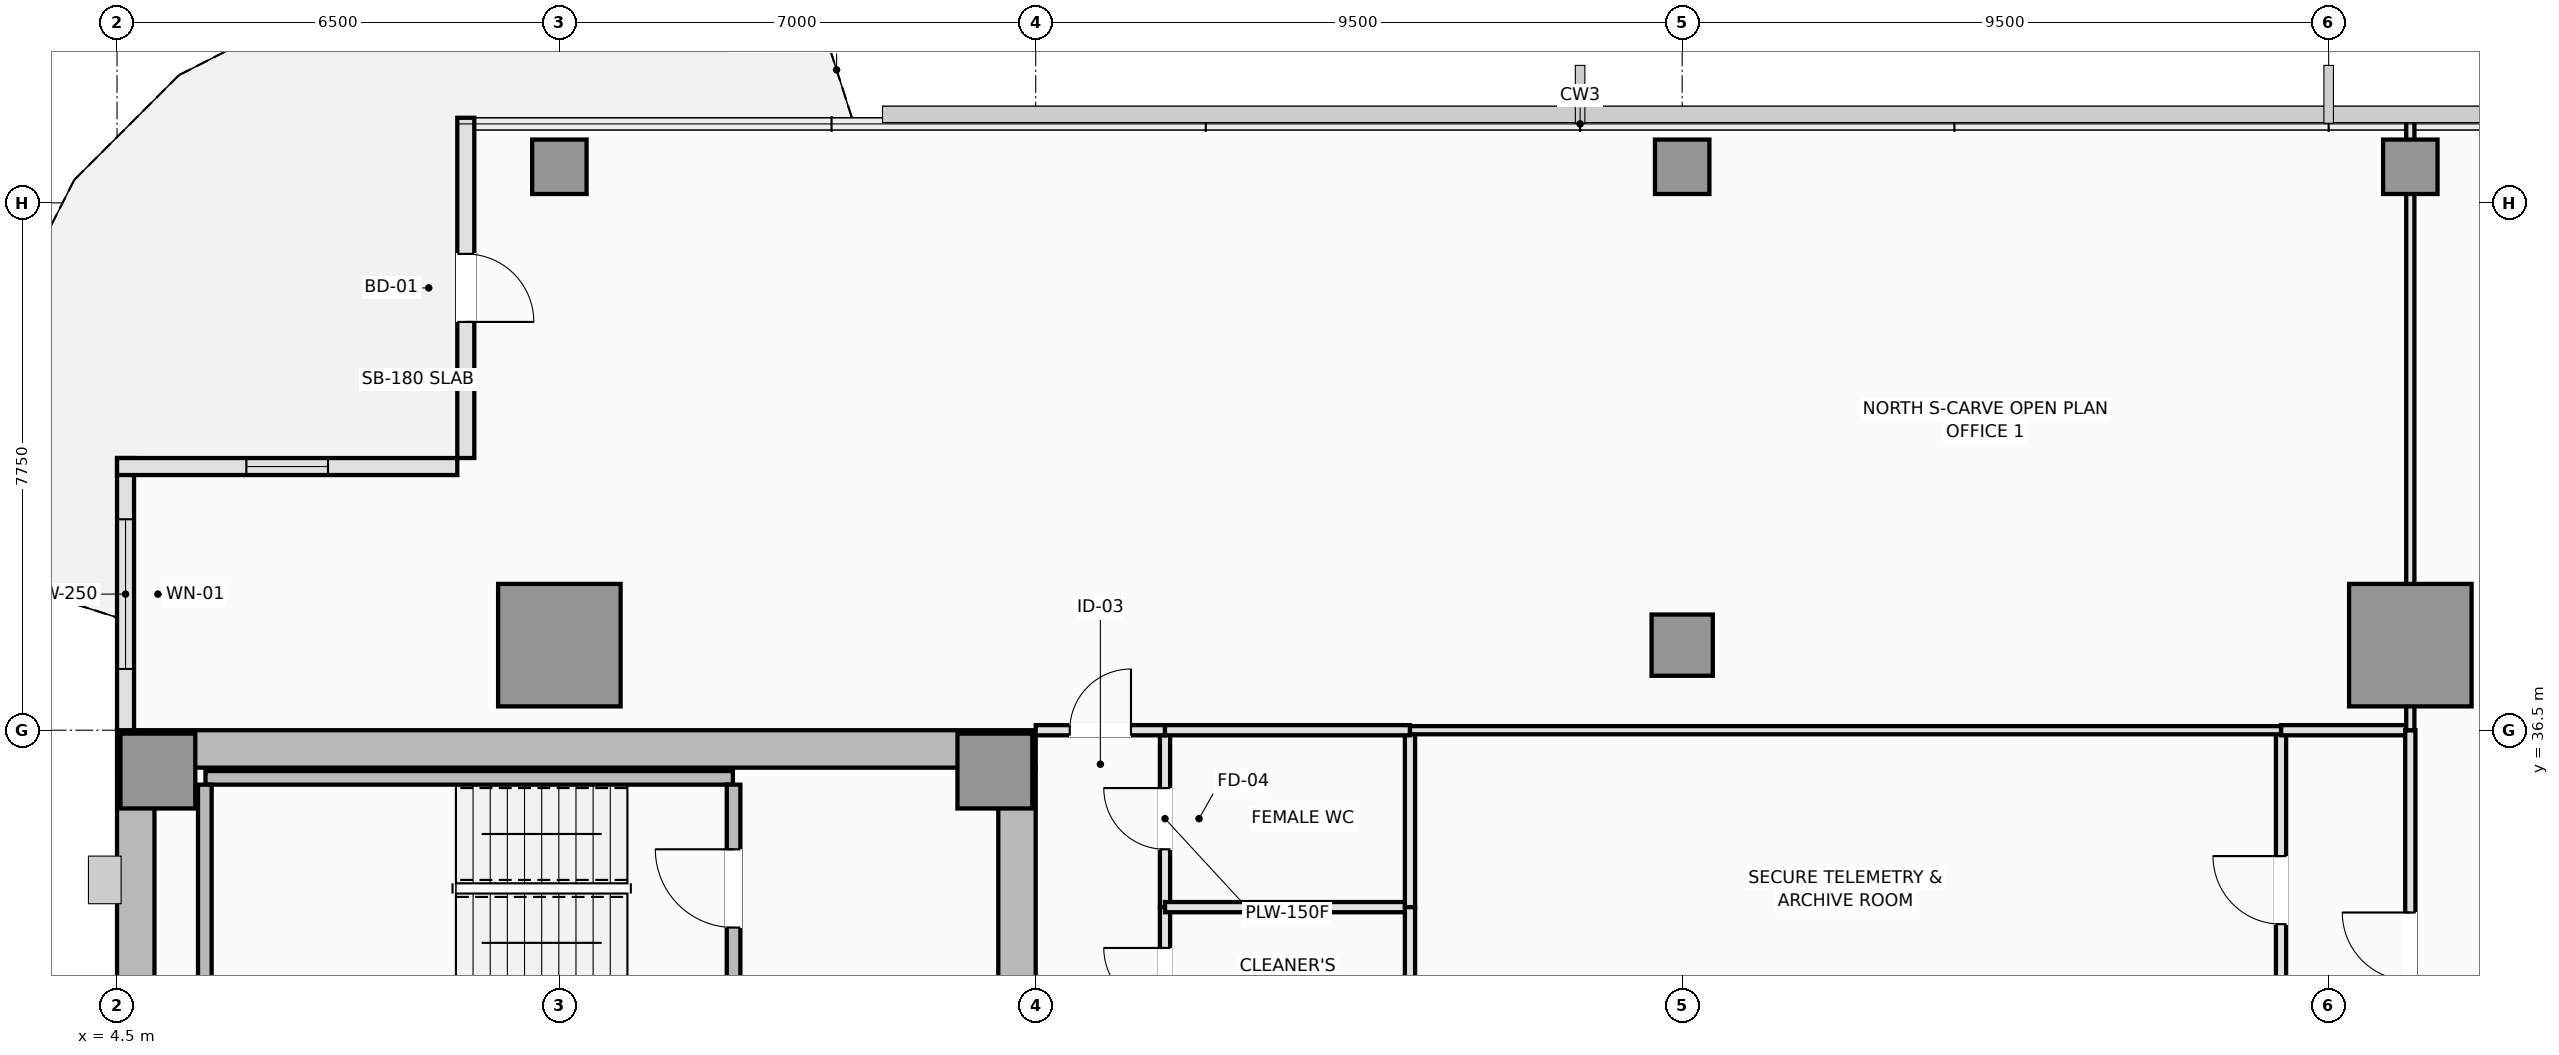
"""IFC4 building model, lengths in metres.
Left out: names, types, materials, properties, quantities, classifications, styles, units other than length and angle.
Written with IfcOpenShell. Run it as: python <this file> out.ifc"""

import sys

from ifc_helpers import new_model, si_unit, direction, frame, frame_2d, origin, origin_2d, place, context, subcontext, project, spatial, rectangle, extrude, element, fill, save


model = new_model("IFC4")
c1 = context("Model", 3, precision=1e-05, world=origin(), true_north=direction((0.0, 1.0)))
c2 = subcontext(c1, "Body", "Model", "MODEL_VIEW")
j1 = project(units=[si_unit("LENGTHUNIT", "METRE"), si_unit("PLANEANGLEUNIT", "RADIAN")], contexts=[c1])
p1 = place(None, origin())
s1 = spatial("IfcSite", under=j1, at=p1, CompositionType="ELEMENT")
p2 = place(p1, origin())
s2 = spatial("IfcBuilding", under=s1, at=p2, CompositionType="ELEMENT")
p3 = place(p2, frame((0.0, 0.0, 202.25)))
s3 = spatial("IfcBuildingStorey", under=s2, at=p3, CompositionType="ELEMENT", Elevation=202.25)
p4 = place(p3, frame((4.5, 36.225, 0.0), z_axis=(0.0, 0.0, 1.0), x_axis=(1.0, 0.0, 0.0)))
e1 = element("IfcWall", 1, at=p4, inside=s3, PredefinedType="SHEAR", context=c2, shape_type="SweptSolid", body=[
    extrude(rectangle(XDim=13.5, YDim=0.55, at=frame_2d((6.75, 0.0))), origin(), (0.0, 0.0, 1.0), 3.55),
])
p5 = place(p3, frame((4.775, 14.55, 0.0), z_axis=(0.0, 0.0, 1.0), x_axis=(0.0, 1.0, 0.0)))
e2 = element("IfcWall", 2, at=p5, inside=s3, PredefinedType="SHEAR", context=c2, shape_type="SweptSolid", body=[
    extrude(rectangle(XDim=21.4, YDim=0.55, at=frame_2d((10.7, 0.0))), origin(), (0.0, 0.0, 1.0), 3.55),
])
p6 = place(p3, frame((17.725, 27.05, 0.0), z_axis=(0.0, 0.0, 1.0), x_axis=(0.0, 1.0, 0.0)))
e3 = element("IfcWall", 3, at=p6, inside=s3, PredefinedType="SHEAR", context=c2, shape_type="SweptSolid", body=[
    extrude(rectangle(XDim=8.9, YDim=0.55, at=frame_2d((4.45, 0.0))), origin(), (0.0, 0.0, 1.0), 3.55),
])
p7 = place(p6, frame((3.45, 0.0, 0.0)))
e4 = element("IfcOpeningElement", 4, at=p7, cuts=e3, PredefinedType="OPENING", context=c2, shape_type="SweptSolid", body=[
    extrude(rectangle(XDim=1.1, YDim=2.15, at=frame_2d((0.55, 1.075))), frame((0.0, 0.285, 0.0), z_axis=(0.0, -1.0, 0.0), x_axis=(1.0, 0.0, 0.0)), (0.0, 0.0, 1.0), 0.57),
])
for number, where, z_axis, x_axis in (
    (5, (5.1, 35.9, 0.0), (0.0, 0.0, 1.0), (1.0, 0.0, 0.0)),
    (6, (17.4, 35.9, 0.0), (0.0, 0.0, 1.0), (1.0, 0.0, 0.0)),
):
    element("IfcColumn", number, at=place(p3, frame(where, z_axis=z_axis, x_axis=x_axis)), inside=s3, PredefinedType="PILASTER", context=c2, shape_type="SweptSolid", body=[
        extrude(rectangle(XDim=1.1, YDim=1.1, at=origin_2d()), origin(), (0.0, 0.0, 1.0), 3.55),
    ])
for number, where, z_axis, x_axis in (
    (7, (11.0, 37.75, 0.0), (0.0, 0.0, 1.0), (1.0, 0.0, 0.0)),
    (8, (38.2, 37.75, 0.0), (0.0, 0.0, 1.0), (1.0, 0.0, 0.0)),
):
    element("IfcColumn", number, at=place(p3, frame(where, z_axis=z_axis, x_axis=x_axis)), inside=s3, PredefinedType="COLUMN", context=c2, shape_type="SweptSolid", body=[
        extrude(rectangle(XDim=1.8, YDim=1.8, at=origin_2d()), origin(), (0.0, 0.0, 1.0), 3.55),
    ])
p8 = place(p3, frame((27.5, 37.75, 0.0), z_axis=(0.0, 0.0, 1.0), x_axis=(1.0, 0.0, 0.0)))
e9 = element("IfcColumn", 9, at=p8, inside=s3, PredefinedType="COLUMN", context=c2, shape_type="SweptSolid", body=[
    extrude(rectangle(XDim=0.9, YDim=0.9, at=origin_2d()), origin(), (0.0, 0.0, 1.0), 3.55),
])
for number, where, z_axis, x_axis in (
    (10, (11.0, 44.78, 0.0), (0.0, 0.0, 1.0), (1.0, 0.0, 0.0)),
    (11, (27.5, 44.78, 0.0), (0.0, 0.0, 1.0), (1.0, 0.0, 0.0)),
    (12, (38.2, 44.78, 0.0), (0.0, 0.0, 1.0), (1.0, 0.0, 0.0)),
):
    element("IfcColumn", number, at=place(p3, frame(where, z_axis=z_axis, x_axis=x_axis)), inside=s3, PredefinedType="COLUMN", context=c2, shape_type="SweptSolid", body=[
        extrude(rectangle(XDim=0.8, YDim=0.8, at=origin_2d()), origin(), (0.0, 0.0, 1.0), 3.55),
    ])
p9 = place(p3, frame((4.625, 40.5, 0.0), z_axis=(0.0, 0.0, 1.0), x_axis=(0.0, -1.0, 0.0)))
e13 = element("IfcWall", 13, at=p9, inside=s3, PredefinedType="SOLIDWALL", context=c2, shape_type="SweptSolid", body=[
    extrude(rectangle(XDim=4.0, YDim=0.25, at=frame_2d((2.0, 0.0))), origin(), (0.0, 0.0, 1.0), 3.37),
])
p10 = place(p9, frame((0.9, 0.0, 0.9)))
e14 = element("IfcOpeningElement", 14, at=p10, cuts=e13, PredefinedType="OPENING", context=c2, shape_type="SweptSolid", body=[
    extrude(rectangle(XDim=2.2, YDim=1.8, at=frame_2d((1.1, 0.9))), frame((0.0, 0.135, 0.0), z_axis=(0.0, -1.0, 0.0), x_axis=(1.0, 0.0, 0.0)), (0.0, 0.0, 1.0), 0.27),
])
p11 = place(p3, frame((9.625, 45.5, 0.0), z_axis=(0.0, 0.0, 1.0), x_axis=(0.0, -1.0, 0.0)))
e15 = element("IfcWall", 15, at=p11, inside=s3, PredefinedType="SOLIDWALL", context=c2, shape_type="SweptSolid", body=[
    extrude(rectangle(XDim=5.0, YDim=0.25, at=frame_2d((2.5, 0.0))), origin(), (0.0, 0.0, 1.0), 3.1),
])
p12 = place(p11, frame((2.0, 0.0, 0.0)))
e16 = element("IfcOpeningElement", 16, at=p12, cuts=e15, PredefinedType="OPENING", context=c2, shape_type="SweptSolid", body=[
    extrude(rectangle(XDim=1.0, YDim=2.2, at=frame_2d((0.5, 1.1))), frame((0.0, 0.135, 0.0), z_axis=(0.0, -1.0, 0.0), x_axis=(1.0, 0.0, 0.0)), (0.0, 0.0, 1.0), 0.27),
])
p13 = place(p3, frame((9.5, 40.375, 0.0), z_axis=(0.0, 0.0, 1.0), x_axis=(-1.0, 0.0, 0.0)))
e17 = element("IfcWall", 17, at=p13, inside=s3, PredefinedType="SOLIDWALL", context=c2, shape_type="SweptSolid", body=[
    extrude(rectangle(XDim=5.0, YDim=0.25, at=frame_2d((2.5, 0.0))), origin(), (0.0, 0.0, 1.0), 3.37),
])
p14 = place(p13, frame((1.9, 0.0, 0.9)))
e18 = element("IfcOpeningElement", 18, at=p14, cuts=e17, PredefinedType="OPENING", context=c2, shape_type="SweptSolid", body=[
    extrude(rectangle(XDim=1.2, YDim=1.8, at=frame_2d((0.6, 0.9))), frame((0.0, 0.135, 0.0), z_axis=(0.0, -1.0, 0.0), x_axis=(1.0, 0.0, 0.0)), (0.0, 0.0, 1.0), 0.27),
])
p15 = place(p3, frame((5.8, 35.8, 0.0), z_axis=(0.0, 0.0, 1.0), x_axis=(1.0, 0.0, 0.0)))
e19 = element("IfcWall", 19, at=p15, inside=s3, PredefinedType="SOLIDWALL", context=c2, shape_type="SweptSolid", body=[
    extrude(rectangle(XDim=7.75, YDim=0.2, at=frame_2d((3.875, 0.0))), origin(), (0.0, 0.0, 1.0), 3.55),
])
p16 = place(p3, frame((5.79, 32.65, 0.0), z_axis=(0.0, 0.0, 1.0), x_axis=(0.0, 1.0, 0.0)))
e20 = element("IfcWall", 20, at=p16, inside=s3, PredefinedType="SOLIDWALL", context=c2, shape_type="SweptSolid", body=[
    extrude(rectangle(XDim=3.05, YDim=0.2, at=frame_2d((1.525, 0.0))), origin(), (0.0, 0.0, 1.0), 3.55),
])
p17 = place(p3, frame((13.56, 32.65, 0.0), z_axis=(0.0, 0.0, 1.0), x_axis=(0.0, 1.0, 0.0)))
e21 = element("IfcWall", 21, at=p17, inside=s3, PredefinedType="SOLIDWALL", context=c2, shape_type="SweptSolid", body=[
    extrude(rectangle(XDim=3.05, YDim=0.2, at=frame_2d((1.525, 0.0))), origin(), (0.0, 0.0, 1.0), 3.55),
])
p18 = place(p17, frame((0.95, 0.0, 0.0)))
e22 = element("IfcOpeningElement", 22, at=p18, cuts=e21, PredefinedType="OPENING", context=c2, shape_type="SweptSolid", body=[
    extrude(rectangle(XDim=1.15, YDim=2.15, at=frame_2d((0.575, 1.075))), frame((0.0, 0.11, 0.0), z_axis=(0.0, -1.0, 0.0), x_axis=(1.0, 0.0, 0.0)), (0.0, 0.0, 1.0), 0.22),
])
p19 = place(p3, frame((19.9, 33.9, 0.0), z_axis=(0.0, 0.0, 1.0), x_axis=(0.0, 1.0, 0.0)))
e23 = element("IfcWall", 23, at=p19, inside=s3, PredefinedType="PLUMBINGWALL", context=c2, shape_type="SweptSolid", body=[
    extrude(rectangle(XDim=2.6, YDim=0.15, at=frame_2d((1.3, 0.0))), origin(), (0.0, 0.0, 1.0), 3.37),
])
p20 = place(p19, frame((0.85, 0.0, 0.0)))
e24 = element("IfcOpeningElement", 24, at=p20, cuts=e23, PredefinedType="OPENING", context=c2, shape_type="SweptSolid", body=[
    extrude(rectangle(XDim=0.9, YDim=2.1, at=frame_2d((0.45, 1.05))), frame((0.0, 0.085, 0.0), z_axis=(0.0, -1.0, 0.0), x_axis=(1.0, 0.0, 0.0)), (0.0, 0.0, 1.0), 0.17),
])
p21 = place(p3, frame((19.9, 31.8, 0.0), z_axis=(0.0, 0.0, 1.0), x_axis=(0.0, 1.0, 0.0)))
e25 = element("IfcWall", 25, at=p21, inside=s3, PredefinedType="PLUMBINGWALL", context=c2, shape_type="SweptSolid", body=[
    extrude(rectangle(XDim=2.1, YDim=0.15, at=frame_2d((1.05, 0.0))), origin(), (0.0, 0.0, 1.0), 3.37),
])
p22 = place(p21, frame((0.6, 0.0, 0.0)))
e26 = element("IfcOpeningElement", 26, at=p22, cuts=e25, PredefinedType="OPENING", context=c2, shape_type="SweptSolid", body=[
    extrude(rectangle(XDim=0.9, YDim=2.1, at=frame_2d((0.45, 1.05))), frame((0.0, 0.085, 0.0), z_axis=(0.0, -1.0, 0.0), x_axis=(1.0, 0.0, 0.0)), (0.0, 0.0, 1.0), 0.17),
])
p23 = place(p3, frame((18.0, 36.5, 0.0), z_axis=(0.0, 0.0, 1.0), x_axis=(1.0, 0.0, 0.0)))
e27 = element("IfcWall", 27, at=p23, inside=s3, PredefinedType="PARTITIONING", context=c2, shape_type="SweptSolid", body=[
    extrude(rectangle(XDim=1.9, YDim=0.15, at=frame_2d((0.95, 0.0))), origin(), (0.0, 0.0, 1.0), 3.37),
])
p24 = place(p23, frame((0.5, 0.0, 0.0)))
e28 = element("IfcOpeningElement", 28, at=p24, cuts=e27, PredefinedType="OPENING", context=c2, shape_type="SweptSolid", body=[
    extrude(rectangle(XDim=0.9, YDim=2.1, at=frame_2d((0.45, 1.05))), frame((0.0, 0.085, 0.0), z_axis=(0.0, -1.0, 0.0), x_axis=(1.0, 0.0, 0.0)), (0.0, 0.0, 1.0), 0.17),
])
p25 = place(p3, frame((36.3, 31.8, 0.0), z_axis=(0.0, 0.0, 1.0), x_axis=(0.0, 1.0, 0.0)))
e29 = element("IfcWall", 29, at=p25, inside=s3, PredefinedType="PARTITIONING", context=c2, shape_type="SweptSolid", body=[
    extrude(rectangle(XDim=4.7, YDim=0.15, at=frame_2d((2.35, 0.0))), origin(), (0.0, 0.0, 1.0), 3.37),
])
p26 = place(p25, frame((1.85, 0.0, 0.0)))
e30 = element("IfcOpeningElement", 30, at=p26, cuts=e29, PredefinedType="OPENING", context=c2, shape_type="SweptSolid", body=[
    extrude(rectangle(XDim=1.0, YDim=2.15, at=frame_2d((0.5, 1.075))), frame((0.0, 0.085, 0.0), z_axis=(0.0, -1.0, 0.0), x_axis=(1.0, 0.0, 0.0)), (0.0, 0.0, 1.0), 0.17),
])
p27 = place(p3, frame((36.3, 36.5, 0.0), z_axis=(0.0, 0.0, 1.0), x_axis=(1.0, 0.0, 0.0)))
e31 = element("IfcWall", 31, at=p27, inside=s3, PredefinedType="PARTITIONING", context=c2, shape_type="SweptSolid", body=[
    extrude(rectangle(XDim=1.9, YDim=0.15, at=frame_2d((0.95, 0.0))), origin(), (0.0, 0.0, 1.0), 3.37),
])
p28 = place(p3, frame((38.2, 29.7, 0.0), z_axis=(0.0, 0.0, 1.0), x_axis=(0.0, 1.0, 0.0)))
e32 = element("IfcWall", 32, at=p28, inside=s3, PredefinedType="PARTITIONING", context=c2, shape_type="SweptSolid", body=[
    extrude(rectangle(XDim=6.8, YDim=0.15, at=frame_2d((3.4, 0.0))), origin(), (0.0, 0.0, 1.0), 2.92),
])
p29 = place(p28, frame((3.121, 0.0, 0.0)))
e33 = element("IfcOpeningElement", 33, at=p29, cuts=e32, PredefinedType="OPENING", context=c2, shape_type="SweptSolid", body=[
    extrude(rectangle(XDim=1.0, YDim=2.15, at=frame_2d((0.5, 1.075))), frame((0.0, 0.085, 0.0), z_axis=(0.0, -1.0, 0.0), x_axis=(1.0, 0.0, 0.0)), (0.0, 0.0, 1.0), 0.17),
])
p30 = place(p3, frame((19.9, 33.9, 0.0), z_axis=(0.0, 0.0, 1.0), x_axis=(1.0, 0.0, 0.0)))
e34 = element("IfcWall", 34, at=p30, inside=s3, PredefinedType="PLUMBINGWALL", context=c2, shape_type="SweptSolid", body=[
    extrude(rectangle(XDim=3.6, YDim=0.15, at=frame_2d((1.8, 0.0))), origin(), (0.0, 0.0, 1.0), 3.37),
])
p31 = place(p3, frame((23.5, 33.9, 0.0), z_axis=(0.0, 0.0, 1.0), x_axis=(0.0, 1.0, 0.0)))
e35 = element("IfcWall", 35, at=p31, inside=s3, PredefinedType="PLUMBINGWALL", context=c2, shape_type="SweptSolid", body=[
    extrude(rectangle(XDim=2.6, YDim=0.15, at=frame_2d((1.3, 0.0))), origin(), (0.0, 0.0, 1.0), 3.37),
])
p32 = place(p3, frame((19.9, 36.5, 0.0), z_axis=(0.0, 0.0, 1.0), x_axis=(1.0, 0.0, 0.0)))
e36 = element("IfcWall", 36, at=p32, inside=s3, PredefinedType="PLUMBINGWALL", context=c2, shape_type="SweptSolid", body=[
    extrude(rectangle(XDim=3.6, YDim=0.15, at=frame_2d((1.8, 0.0))), origin(), (0.0, 0.0, 1.0), 3.37),
])
p33 = place(p3, frame((23.5, 31.8, 0.0), z_axis=(0.0, 0.0, 1.0), x_axis=(0.0, 1.0, 0.0)))
e37 = element("IfcWall", 37, at=p33, inside=s3, PredefinedType="PLUMBINGWALL", context=c2, shape_type="SweptSolid", body=[
    extrude(rectangle(XDim=2.1, YDim=0.15, at=frame_2d((1.05, 0.0))), origin(), (0.0, 0.0, 1.0), 3.37),
])
p34 = place(p3, frame((23.5, 36.5, 0.0), z_axis=(0.0, 0.0, 1.0), x_axis=(1.0, 0.0, 0.0)))
e38 = element("IfcWall", 38, at=p34, inside=s3, PredefinedType="PARTITIONING", context=c2, shape_type="SweptSolid", body=[
    extrude(rectangle(XDim=12.8, YDim=0.12, at=frame_2d((6.4, 0.0))), origin(), (0.0, 0.0, 1.0), 3.37),
])
p35 = place(p3, frame((38.2, 36.5, 0.0), z_axis=(0.0, 0.0, 1.0), x_axis=(0.0, 1.0, 0.0)))
e39 = element("IfcWall", 39, at=p35, inside=s3, PredefinedType="PARTITIONING", context=c2, shape_type="SweptSolid", body=[
    extrude(rectangle(XDim=8.99, YDim=0.12, at=frame_2d((4.495, 0.0))), origin(), (0.0, 0.0, 1.0), 2.92),
])
p36 = place(p10, origin())
e40 = element("IfcWindow", 40, at=p36, inside=s3, PartitioningType="SINGLE_PANEL", PredefinedType="WINDOW", context=c2, shape_type="SweptSolid", body=[
    extrude(rectangle(XDim=2.2, YDim=1.8, at=frame_2d((1.1, 0.9))), frame((0.0, 0.03, 0.0), z_axis=(0.0, -1.0, 0.0), x_axis=(1.0, 0.0, 0.0)), (0.0, 0.0, 1.0), 0.06),
])
fill(e14, e40)
p37 = place(p12, frame((1.0, 0.0, 0.0), z_axis=(0.0, 0.0, 1.0), x_axis=(-1.0, 0.0, 0.0)))
e41 = element("IfcDoor", 41, at=p37, inside=s3, OperationType="SINGLE_SWING_RIGHT", PredefinedType="DOOR", context=c2, shape_type="SweptSolid", body=[
    extrude(rectangle(XDim=1.0, YDim=2.2, at=frame_2d((0.5, 1.1))), frame((0.0, 0.025, 0.0), z_axis=(0.0, -1.0, 0.0), x_axis=(1.0, 0.0, 0.0)), (0.0, 0.0, 1.0), 0.05),
])
fill(e16, e41)
p38 = place(p14, origin())
e42 = element("IfcWindow", 42, at=p38, inside=s3, PartitioningType="SINGLE_PANEL", PredefinedType="WINDOW", context=c2, shape_type="SweptSolid", body=[
    extrude(rectangle(XDim=1.2, YDim=1.8, at=frame_2d((0.6, 0.9))), frame((0.0, 0.03, 0.0), z_axis=(0.0, -1.0, 0.0), x_axis=(1.0, 0.0, 0.0)), (0.0, 0.0, 1.0), 0.06),
])
fill(e18, e42)
p39 = place(p18, origin())
e43 = element("IfcDoor", 43, at=p39, inside=s3, OperationType="SINGLE_SWING_RIGHT", PredefinedType="DOOR", context=c2, shape_type="SweptSolid", body=[
    extrude(rectangle(XDim=1.15, YDim=2.15, at=frame_2d((0.575, 1.075))), frame((0.0, 0.025, 0.0), z_axis=(0.0, -1.0, 0.0), x_axis=(1.0, 0.0, 0.0)), (0.0, 0.0, 1.0), 0.05),
])
fill(e22, e43)
p40 = place(p20, origin())
e44 = element("IfcDoor", 44, at=p40, inside=s3, OperationType="SINGLE_SWING_RIGHT", PredefinedType="DOOR", context=c2, shape_type="SweptSolid", body=[
    extrude(rectangle(XDim=0.9, YDim=2.1, at=frame_2d((0.45, 1.05))), frame((0.0, 0.025, 0.0), z_axis=(0.0, -1.0, 0.0), x_axis=(1.0, 0.0, 0.0)), (0.0, 0.0, 1.0), 0.05),
])
fill(e24, e44)
p41 = place(p22, origin())
e45 = element("IfcDoor", 45, at=p41, inside=s3, OperationType="SINGLE_SWING_RIGHT", PredefinedType="DOOR", context=c2, shape_type="SweptSolid", body=[
    extrude(rectangle(XDim=0.9, YDim=2.1, at=frame_2d((0.45, 1.05))), frame((0.0, 0.025, 0.0), z_axis=(0.0, -1.0, 0.0), x_axis=(1.0, 0.0, 0.0)), (0.0, 0.0, 1.0), 0.05),
])
fill(e26, e45)
p42 = place(p24, origin())
e46 = element("IfcDoor", 46, at=p42, inside=s3, OperationType="SINGLE_SWING_RIGHT", PredefinedType="DOOR", context=c2, shape_type="SweptSolid", body=[
    extrude(rectangle(XDim=0.9, YDim=2.1, at=frame_2d((0.45, 1.05))), frame((0.0, 0.025, 0.0), z_axis=(0.0, -1.0, 0.0), x_axis=(1.0, 0.0, 0.0)), (0.0, 0.0, 1.0), 0.05),
])
fill(e28, e46)
p43 = place(p26, origin())
e47 = element("IfcDoor", 47, at=p43, inside=s3, OperationType="SINGLE_SWING_RIGHT", PredefinedType="DOOR", context=c2, shape_type="SweptSolid", body=[
    extrude(rectangle(XDim=1.0, YDim=2.15, at=frame_2d((0.5, 1.075))), frame((0.0, 0.025, 0.0), z_axis=(0.0, -1.0, 0.0), x_axis=(1.0, 0.0, 0.0)), (0.0, 0.0, 1.0), 0.05),
])
fill(e30, e47)
p44 = place(p29, origin())
e48 = element("IfcDoor", 48, at=p44, inside=s3, OperationType="SINGLE_SWING_RIGHT", PredefinedType="DOOR", context=c2, shape_type="SweptSolid", body=[
    extrude(rectangle(XDim=1.0, YDim=2.15, at=frame_2d((0.5, 1.075))), frame((0.0, 0.025, 0.0), z_axis=(0.0, -1.0, 0.0), x_axis=(1.0, 0.0, 0.0)), (0.0, 0.0, 1.0), 0.05),
])
fill(e33, e48)
save(model, sys.argv[1])
